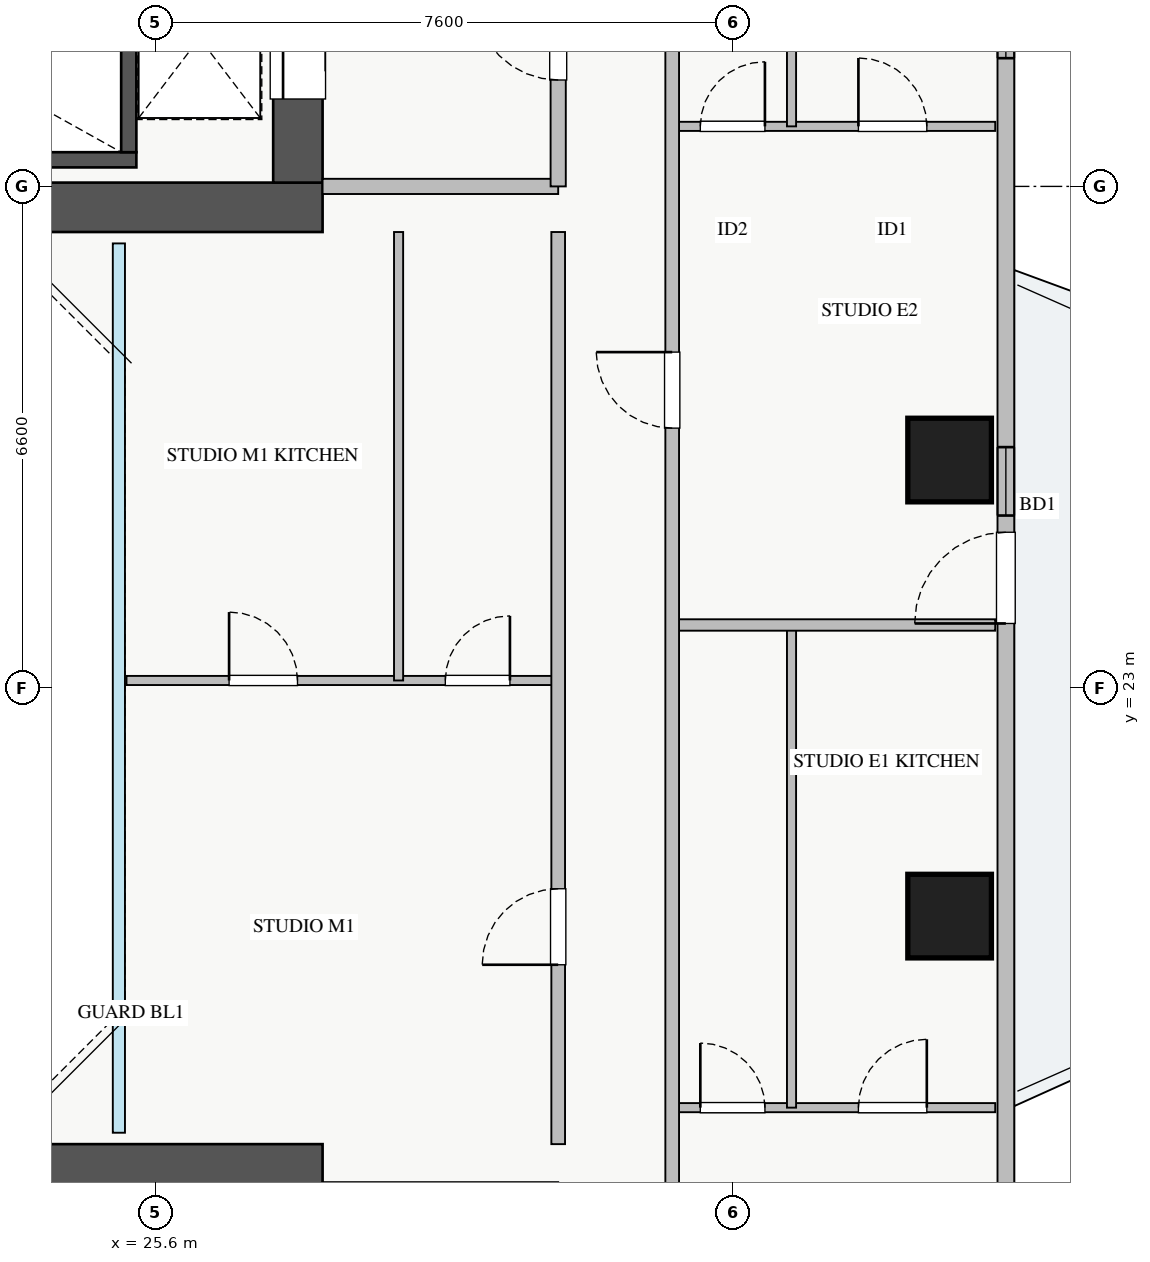
"""IFC4 building model, lengths in metres.
Left out: names, types, materials, properties, quantities, classifications, styles, units other than length and angle.
Written with IfcOpenShell. Run it as: python <this file> out.ifc"""

import sys

from ifc_helpers import new_model, si_unit, direction, frame, frame_2d, origin, origin_2d, place, context, subcontext, project, spatial, rectangle, extrude, source, transform, mapped, element, fill, save


model = new_model("IFC4")
c1 = context("Model", 3, precision=1e-05, world=origin(), true_north=direction((0.0, 1.0)))
c2 = subcontext(c1, "Body", "Model", "MODEL_VIEW")
j1 = project(units=[si_unit("LENGTHUNIT", "METRE"), si_unit("PLANEANGLEUNIT", "RADIAN")], contexts=[c1])
p1 = place(None, origin())
s1 = spatial("IfcSite", under=j1, at=p1, CompositionType="ELEMENT")
p2 = place(p1, origin())
s2 = spatial("IfcBuilding", under=s1, at=p2, CompositionType="ELEMENT")
p3 = place(p2, frame((0.0, 0.0, 136.0)))
s3 = spatial("IfcBuildingStorey", under=s2, at=p3, CompositionType="ELEMENT", Elevation=136.0)
p4 = place(p3, frame((18.2, 29.95, 0.0), z_axis=(0.0, 0.0, 1.0), x_axis=(1.0, 0.0, 0.0)))
e1 = element("IfcWall", 1, at=p4, inside=s3, PredefinedType="SHEAR", context=c2, shape_type="SweptSolid", body=[
    extrude(rectangle(XDim=7.15, YDim=0.2, at=frame_2d((3.575, 0.0))), origin(), (0.0, 0.0, 1.0), 3.25),
])
p5 = place(p3, frame((25.25, 30.05, 0.0), z_axis=(0.0, 0.0, 1.0), x_axis=(0.0, 1.0, 0.0)))
e2 = element("IfcWall", 2, at=p5, inside=s3, PredefinedType="SHEAR", context=c2, shape_type="SweptSolid", body=[
    extrude(rectangle(XDim=2.94, YDim=0.2, at=frame_2d((1.47, 0.0))), origin(), (0.0, 0.0, 1.0), 3.25),
])
p6 = place(p3, frame((10.2, 29.325, 0.0), z_axis=(0.0, 0.0, 1.0), x_axis=(1.0, 0.0, 0.0)))
e3 = element("IfcWall", 3, at=p6, inside=s3, PredefinedType="SHEAR", context=c2, shape_type="SweptSolid", body=[
    extrude(rectangle(XDim=17.6, YDim=0.65, at=frame_2d((8.8, 0.0))), origin(), (0.0, 0.0, 1.0), 3.25),
])
p7 = place(p3, frame((27.475, 29.65, 0.0), z_axis=(0.0, 0.0, 1.0), x_axis=(0.0, 1.0, 0.0)))
e4 = element("IfcWall", 4, at=p7, inside=s3, PredefinedType="SHEAR", context=c2, shape_type="SweptSolid", body=[
    extrude(rectangle(XDim=5.9, YDim=0.65, at=frame_2d((2.95, 0.0))), origin(), (0.0, 0.0, 1.0), 3.25),
])
p8 = place(p7, frame((1.1, 0.0, 0.0)))
e5 = element("IfcOpeningElement", 5, at=p8, cuts=e4, PredefinedType="OPENING", context=c2, shape_type="SweptSolid", body=[
    extrude(rectangle(XDim=1.3, YDim=2.05, at=frame_2d((0.65, 1.025))), frame((0.0, 0.335, 0.0), z_axis=(0.0, -1.0, 0.0), x_axis=(1.0, 0.0, 0.0)), (0.0, 0.0, 1.0), 0.67),
])
p9 = place(p3, frame((10.2, 16.675, 0.0), z_axis=(0.0, 0.0, 1.0), x_axis=(1.0, 0.0, 0.0)))
e6 = element("IfcWall", 6, at=p9, inside=s3, PredefinedType="SHEAR", context=c2, shape_type="SweptSolid", body=[
    extrude(rectangle(XDim=17.6, YDim=0.65, at=frame_2d((8.8, 0.0))), origin(), (0.0, 0.0, 1.0), 3.25),
])
m1 = source(origin(), c2, "Body", "SweptSolid", [
    extrude(rectangle(XDim=1.1, YDim=1.1, at=origin_2d()), origin(), (0.0, 0.0, 1.0), 3.25),
])
for number, where, z_axis, x_axis in (
    (7, (36.05, 20.0, 0.0), (0.0, 0.0, 1.0), (1.0, 0.0, 0.0)),
    (8, (36.05, 26.0, 0.0), (0.0, 0.0, 1.0), (1.0, 0.0, 0.0)),
):
    element("IfcColumn", number, at=place(p3, frame(where, z_axis=z_axis, x_axis=x_axis)), inside=s3, PredefinedType="COLUMN", context=c2, shape_type="MappedRepresentation", body=[
        mapped(m1, transform((0.0, 0.0, 0.0), x_axis=(1.0, 0.0, 0.0), y_axis=(0.0, 1.0, 0.0), z_axis=(0.0, 0.0, 1.0), scale=1.0)),
    ])
p10 = place(p3, frame((36.79, 10.55, 0.0), z_axis=(0.0, 0.0, 1.0), x_axis=(0.0, 1.0, 0.0)))
e9 = element("IfcWall", 9, at=p10, inside=s3, PredefinedType="STANDARD", context=c2, shape_type="SweptSolid", body=[
    extrude(rectangle(XDim=24.9, YDim=0.22, at=frame_2d((12.45, 0.0))), origin(), (0.0, 0.0, 1.0), 2.57),
])
p11 = place(p10, frame((13.3, 0.0, 0.0)))
e10 = element("IfcOpeningElement", 10, at=p11, cuts=e9, PredefinedType="OPENING", context=c2, shape_type="SweptSolid", body=[
    extrude(rectangle(XDim=1.2, YDim=2.1, at=frame_2d((0.6, 1.05))), frame((0.0, 0.12, 0.0), z_axis=(0.0, -1.0, 0.0), x_axis=(1.0, 0.0, 0.0)), (0.0, 0.0, 1.0), 0.24),
])
p12 = place(p10, frame((1.912, 0.0, 0.9)))
e11 = element("IfcOpeningElement", 11, at=p12, cuts=e9, PredefinedType="OPENING", context=c2, shape_type="SweptSolid", body=[
    extrude(rectangle(XDim=2.4, YDim=1.48, at=frame_2d((1.2, 0.74))), frame((0.0, 0.12, 0.0), z_axis=(0.0, -1.0, 0.0), x_axis=(1.0, 0.0, 0.0)), (0.0, 0.0, 1.0), 0.24),
])
p13 = place(p10, frame((20.737, 0.0, 0.9)))
e12 = element("IfcOpeningElement", 12, at=p13, cuts=e9, PredefinedType="OPENING", context=c2, shape_type="SweptSolid", body=[
    extrude(rectangle(XDim=2.1, YDim=1.48, at=frame_2d((1.05, 0.74))), frame((0.0, 0.12, 0.0), z_axis=(0.0, -1.0, 0.0), x_axis=(1.0, 0.0, 0.0)), (0.0, 0.0, 1.0), 0.24),
])
p14 = place(p10, frame((14.72, 0.0, 0.9)))
e13 = element("IfcOpeningElement", 13, at=p14, cuts=e9, PredefinedType="OPENING", context=c2, shape_type="SweptSolid", body=[
    extrude(rectangle(XDim=0.9, YDim=1.2, at=frame_2d((0.45, 0.6))), frame((0.0, 0.12, 0.0), z_axis=(0.0, -1.0, 0.0), x_axis=(1.0, 0.0, 0.0)), (0.0, 0.0, 1.0), 0.24),
])
p15 = place(p3, frame((27.8, 29.6, 0.0), z_axis=(0.0, 0.0, 1.0), x_axis=(1.0, 0.0, 0.0)))
e14 = element("IfcWall", 14, at=p15, inside=s3, PredefinedType="PARTITIONING", context=c2, shape_type="SweptSolid", body=[
    extrude(rectangle(XDim=3.1, YDim=0.2, at=frame_2d((1.55, 0.0))), origin(), (0.0, 0.0, 1.0), 3.03),
])
p16 = place(p3, frame((30.9, 29.6, 0.0), z_axis=(0.0, 0.0, 1.0), x_axis=(0.0, 1.0, 0.0)))
e15 = element("IfcWall", 15, at=p16, inside=s3, PredefinedType="PARTITIONING", context=c2, shape_type="SweptSolid", body=[
    extrude(rectangle(XDim=3.9, YDim=0.2, at=frame_2d((1.95, 0.0))), origin(), (0.0, 0.0, 1.0), 3.03),
])
p17 = place(p16, frame((1.4, 0.0, 0.0)))
e16 = element("IfcOpeningElement", 16, at=p17, cuts=e15, PredefinedType="OPENING", context=c2, shape_type="SweptSolid", body=[
    extrude(rectangle(XDim=1.1, YDim=2.05, at=frame_2d((0.55, 1.025))), frame((0.0, 0.11, 0.0), z_axis=(0.0, -1.0, 0.0), x_axis=(1.0, 0.0, 0.0)), (0.0, 0.0, 1.0), 0.22),
])
p18 = place(p3, frame((32.4, 17.48, 0.0), z_axis=(0.0, 0.0, 1.0), x_axis=(1.0, 0.0, 0.0)))
e17 = element("IfcWall", 17, at=p18, inside=s3, PredefinedType="PLUMBINGWALL", context=c2, shape_type="SweptSolid", body=[
    extrude(rectangle(XDim=4.25, YDim=0.12, at=frame_2d((2.125, 0.0))), origin(), (0.0, 0.0, 1.0), 3.03),
])
p19 = place(p18, frame((0.37, 0.0, 0.0)))
e18 = element("IfcOpeningElement", 18, at=p19, cuts=e17, PredefinedType="OPENING", context=c2, shape_type="SweptSolid", body=[
    extrude(rectangle(XDim=0.85, YDim=2.05, at=frame_2d((0.425, 1.025))), frame((0.0, 0.07, 0.0), z_axis=(0.0, -1.0, 0.0), x_axis=(1.0, 0.0, 0.0)), (0.0, 0.0, 1.0), 0.14),
])
p20 = place(p18, frame((2.45, 0.0, 0.0)))
e19 = element("IfcOpeningElement", 19, at=p20, cuts=e17, PredefinedType="OPENING", context=c2, shape_type="SweptSolid", body=[
    extrude(rectangle(XDim=0.9, YDim=2.05, at=frame_2d((0.45, 1.025))), frame((0.0, 0.07, 0.0), z_axis=(0.0, -1.0, 0.0), x_axis=(1.0, 0.0, 0.0)), (0.0, 0.0, 1.0), 0.14),
])
p21 = place(p3, frame((33.97, 17.48, 0.0), z_axis=(0.0, 0.0, 1.0), x_axis=(0.0, 1.0, 0.0)))
e20 = element("IfcWall", 20, at=p21, inside=s3, PredefinedType="PLUMBINGWALL", context=c2, shape_type="SweptSolid", body=[
    extrude(rectangle(XDim=6.35, YDim=0.12, at=frame_2d((3.175, 0.0))), origin(), (0.0, 0.0, 1.0), 3.03),
])
p22 = place(p3, frame((32.4, 30.39, 0.0), z_axis=(0.0, 0.0, 1.0), x_axis=(1.0, 0.0, 0.0)))
e21 = element("IfcWall", 21, at=p22, inside=s3, PredefinedType="PLUMBINGWALL", context=c2, shape_type="SweptSolid", body=[
    extrude(rectangle(XDim=4.25, YDim=0.12, at=frame_2d((2.125, 0.0))), origin(), (0.0, 0.0, 1.0), 3.03),
])
p23 = place(p22, frame((0.37, 0.0, 0.0)))
e22 = element("IfcOpeningElement", 22, at=p23, cuts=e21, PredefinedType="OPENING", context=c2, shape_type="SweptSolid", body=[
    extrude(rectangle(XDim=0.85, YDim=2.05, at=frame_2d((0.425, 1.025))), frame((0.0, 0.07, 0.0), z_axis=(0.0, -1.0, 0.0), x_axis=(1.0, 0.0, 0.0)), (0.0, 0.0, 1.0), 0.14),
])
p24 = place(p22, frame((2.45, 0.0, 0.0)))
e23 = element("IfcOpeningElement", 23, at=p24, cuts=e21, PredefinedType="OPENING", context=c2, shape_type="SweptSolid", body=[
    extrude(rectangle(XDim=0.9, YDim=2.05, at=frame_2d((0.45, 1.025))), frame((0.0, 0.07, 0.0), z_axis=(0.0, -1.0, 0.0), x_axis=(1.0, 0.0, 0.0)), (0.0, 0.0, 1.0), 0.14),
])
p25 = place(p3, frame((33.97, 30.39, 0.0), z_axis=(0.0, 0.0, 1.0), x_axis=(0.0, 1.0, 0.0)))
e24 = element("IfcWall", 24, at=p25, inside=s3, PredefinedType="PLUMBINGWALL", context=c2, shape_type="SweptSolid", body=[
    extrude(rectangle(XDim=5.59, YDim=0.12, at=frame_2d((2.795, 0.0))), origin(), (0.0, 0.0, 1.0), 3.03),
])
p26 = place(p3, frame((32.4, 23.83, 0.0), z_axis=(0.0, 0.0, 1.0), x_axis=(1.0, 0.0, 0.0)))
e25 = element("IfcWall", 25, at=p26, inside=s3, PredefinedType="PARTITIONING", context=c2, shape_type="SweptSolid", body=[
    extrude(rectangle(XDim=4.25, YDim=0.15, at=frame_2d((2.125, 0.0))), origin(), (0.0, 0.0, 1.0), 3.03),
])
p27 = place(p3, frame((32.4, 8.31, 0.0), z_axis=(0.0, 0.0, 1.0), x_axis=(0.0, 1.0, 0.0)))
e26 = element("IfcWall", 26, at=p27, inside=s3, PredefinedType="PARTITIONING", context=c2, shape_type="SweptSolid", body=[
    extrude(rectangle(XDim=29.13, YDim=0.18, at=frame_2d((14.565, 0.0))), origin(), (0.0, 0.0, 1.0), 3.03),
])
p28 = place(p27, frame((27.94, 0.0, 0.0)))
e27 = element("IfcOpeningElement", 27, at=p28, cuts=e26, PredefinedType="OPENING", context=c2, shape_type="SweptSolid", body=[
    extrude(rectangle(XDim=0.9, YDim=2.05, at=frame_2d((0.45, 1.025))), frame((0.0, 0.1, 0.0), z_axis=(0.0, -1.0, 0.0), x_axis=(1.0, 0.0, 0.0)), (0.0, 0.0, 1.0), 0.2),
])
p29 = place(p27, frame((0.415, 0.0, 0.0)))
e28 = element("IfcOpeningElement", 28, at=p29, cuts=e26, PredefinedType="OPENING", context=c2, shape_type="SweptSolid", body=[
    extrude(rectangle(XDim=0.9, YDim=2.05, at=frame_2d((0.45, 1.025))), frame((0.0, 0.1, 0.0), z_axis=(0.0, -1.0, 0.0), x_axis=(1.0, 0.0, 0.0)), (0.0, 0.0, 1.0), 0.2),
])
p30 = place(p27, frame((4.75, 0.0, 0.0)))
e29 = element("IfcOpeningElement", 29, at=p30, cuts=e26, PredefinedType="OPENING", context=c2, shape_type="SweptSolid", body=[
    extrude(rectangle(XDim=1.0, YDim=2.05, at=frame_2d((0.5, 1.025))), frame((0.0, 0.1, 0.0), z_axis=(0.0, -1.0, 0.0), x_axis=(1.0, 0.0, 0.0)), (0.0, 0.0, 1.0), 0.2),
])
p31 = place(p27, frame((18.11, 0.0, 0.0)))
e30 = element("IfcOpeningElement", 30, at=p31, cuts=e26, PredefinedType="OPENING", context=c2, shape_type="SweptSolid", body=[
    extrude(rectangle(XDim=1.0, YDim=2.05, at=frame_2d((0.5, 1.025))), frame((0.0, 0.1, 0.0), z_axis=(0.0, -1.0, 0.0), x_axis=(1.0, 0.0, 0.0)), (0.0, 0.0, 1.0), 0.2),
])
p32 = place(p3, frame((25.22, 23.1, 0.0), z_axis=(0.0, 0.0, 1.0), x_axis=(1.0, 0.0, 0.0)))
e31 = element("IfcWall", 31, at=p32, inside=s3, PredefinedType="PLUMBINGWALL", context=c2, shape_type="SweptSolid", body=[
    extrude(rectangle(XDim=5.68, YDim=0.12, at=frame_2d((2.84, 0.0))), origin(), (0.0, 0.0, 1.0), 3.03),
])
p33 = place(p32, frame((1.35, 0.0, 0.0)))
e32 = element("IfcOpeningElement", 32, at=p33, cuts=e31, PredefinedType="OPENING", context=c2, shape_type="SweptSolid", body=[
    extrude(rectangle(XDim=0.9, YDim=2.05, at=frame_2d((0.45, 1.025))), frame((0.0, 0.07, 0.0), z_axis=(0.0, -1.0, 0.0), x_axis=(1.0, 0.0, 0.0)), (0.0, 0.0, 1.0), 0.14),
])
p34 = place(p32, frame((4.195, 0.0, 0.0)))
e33 = element("IfcOpeningElement", 33, at=p34, cuts=e31, PredefinedType="OPENING", context=c2, shape_type="SweptSolid", body=[
    extrude(rectangle(XDim=0.85, YDim=2.05, at=frame_2d((0.425, 1.025))), frame((0.0, 0.07, 0.0), z_axis=(0.0, -1.0, 0.0), x_axis=(1.0, 0.0, 0.0)), (0.0, 0.0, 1.0), 0.14),
])
p35 = place(p3, frame((28.8, 23.1, 0.0), z_axis=(0.0, 0.0, 1.0), x_axis=(0.0, 1.0, 0.0)))
e34 = element("IfcWall", 34, at=p35, inside=s3, PredefinedType="PLUMBINGWALL", context=c2, shape_type="SweptSolid", body=[
    extrude(rectangle(XDim=5.9, YDim=0.12, at=frame_2d((2.95, 0.0))), origin(), (0.0, 0.0, 1.0), 3.03),
])
p36 = place(p3, frame((30.9, 17.0, 0.0), z_axis=(0.0, 0.0, 1.0), x_axis=(0.0, 1.0, 0.0)))
e35 = element("IfcWall", 35, at=p36, inside=s3, PredefinedType="PARTITIONING", context=c2, shape_type="SweptSolid", body=[
    extrude(rectangle(XDim=12.0, YDim=0.18, at=frame_2d((6.0, 0.0))), origin(), (0.0, 0.0, 1.0), 3.03),
])
p37 = place(p36, frame((2.36, 0.0, 0.0)))
e36 = element("IfcOpeningElement", 36, at=p37, cuts=e35, PredefinedType="OPENING", context=c2, shape_type="SweptSolid", body=[
    extrude(rectangle(XDim=1.0, YDim=2.05, at=frame_2d((0.5, 1.025))), frame((0.0, 0.1, 0.0), z_axis=(0.0, -1.0, 0.0), x_axis=(1.0, 0.0, 0.0)), (0.0, 0.0, 1.0), 0.2),
])
m2 = source(origin(), c2, "Body", "SweptSolid", [
    extrude(rectangle(XDim=1.2, YDim=2.1, at=frame_2d((0.6, 1.05))), frame((0.0, 0.025, 0.0), z_axis=(0.0, -1.0, 0.0), x_axis=(1.0, 0.0, 0.0)), (0.0, 0.0, 1.0), 0.05),
])
p38 = place(p11, origin())
e37 = element("IfcDoor", 37, at=p38, inside=s3, OperationType="SINGLE_SWING_LEFT", PredefinedType="DOOR", context=c2, shape_type="MappedRepresentation", body=[
    mapped(m2, transform((0.0, 0.0, 0.0), x_axis=(1.0, 0.0, 0.0), y_axis=(0.0, 1.0, 0.0), z_axis=(0.0, 0.0, 1.0), scale=1.0)),
])
fill(e10, e37)
m3 = source(origin(), c2, "Body", "SweptSolid", [
    extrude(rectangle(XDim=2.1, YDim=1.48, at=frame_2d((1.05, 0.74))), frame((0.0, 0.03, 0.0), z_axis=(0.0, -1.0, 0.0), x_axis=(1.0, 0.0, 0.0)), (0.0, 0.0, 1.0), 0.06),
])
p39 = place(p13, origin())
e38 = element("IfcWindow", 38, at=p39, inside=s3, PartitioningType="TRIPLE_PANEL_VERTICAL", PredefinedType="WINDOW", context=c2, shape_type="MappedRepresentation", body=[
    mapped(m3, transform((0.0, 0.0, 0.0), x_axis=(1.0, 0.0, 0.0), y_axis=(0.0, 1.0, 0.0), z_axis=(0.0, 0.0, 1.0), scale=1.0)),
])
fill(e12, e38)
m4 = source(origin(), c2, "Body", "SweptSolid", [
    extrude(rectangle(XDim=1.3, YDim=2.05, at=frame_2d((0.65, 1.025))), frame((0.0, 0.025, 0.0), z_axis=(0.0, -1.0, 0.0), x_axis=(1.0, 0.0, 0.0)), (0.0, 0.0, 1.0), 0.05),
])
p40 = place(p8, origin())
e39 = element("IfcDoor", 39, at=p40, inside=s3, OperationType="SLIDING_TO_LEFT", PredefinedType="DOOR", context=c2, shape_type="MappedRepresentation", body=[
    mapped(m4, transform((0.0, 0.0, 0.0), x_axis=(1.0, 0.0, 0.0), y_axis=(0.0, 1.0, 0.0), z_axis=(0.0, 0.0, 1.0), scale=1.0)),
])
fill(e5, e39)
m5 = source(origin(), c2, "Body", "SweptSolid", [
    extrude(rectangle(XDim=1.1, YDim=2.05, at=frame_2d((0.55, 1.025))), frame((0.0, 0.025, 0.0), z_axis=(0.0, -1.0, 0.0), x_axis=(1.0, 0.0, 0.0)), (0.0, 0.0, 1.0), 0.05),
])
p41 = place(p17, origin())
e40 = element("IfcDoor", 40, at=p41, inside=s3, OperationType="SINGLE_SWING_RIGHT", PredefinedType="DOOR", context=c2, shape_type="MappedRepresentation", body=[
    mapped(m5, transform((0.0, 0.0, 0.0), x_axis=(1.0, 0.0, 0.0), y_axis=(0.0, 1.0, 0.0), z_axis=(0.0, 0.0, 1.0), scale=1.0)),
])
fill(e16, e40)
m6 = source(origin(), c2, "Body", "SweptSolid", [
    extrude(rectangle(XDim=0.85, YDim=2.05, at=frame_2d((0.425, 1.025))), frame((0.0, 0.025, 0.0), z_axis=(0.0, -1.0, 0.0), x_axis=(1.0, 0.0, 0.0)), (0.0, 0.0, 1.0), 0.05),
])
p42 = place(p19, origin())
e41 = element("IfcDoor", 41, at=p42, inside=s3, OperationType="SINGLE_SWING_LEFT", PredefinedType="DOOR", context=c2, shape_type="MappedRepresentation", body=[
    mapped(m6, transform((0.0, 0.0, 0.0), x_axis=(1.0, 0.0, 0.0), y_axis=(0.0, 1.0, 0.0), z_axis=(0.0, 0.0, 1.0), scale=1.0)),
])
fill(e18, e41)
m7 = source(origin(), c2, "Body", "SweptSolid", [
    extrude(rectangle(XDim=0.9, YDim=2.05, at=frame_2d((0.45, 1.025))), frame((0.0, 0.025, 0.0), z_axis=(0.0, -1.0, 0.0), x_axis=(1.0, 0.0, 0.0)), (0.0, 0.0, 1.0), 0.05),
])
p43 = place(p20, origin())
e42 = element("IfcDoor", 42, at=p43, inside=s3, OperationType="SINGLE_SWING_RIGHT", PredefinedType="DOOR", context=c2, shape_type="MappedRepresentation", body=[
    mapped(m7, transform((0.0, 0.0, 0.0), x_axis=(1.0, 0.0, 0.0), y_axis=(0.0, 1.0, 0.0), z_axis=(0.0, 0.0, 1.0), scale=1.0)),
])
fill(e19, e42)
p44 = place(p23, origin())
e43 = element("IfcDoor", 43, at=p44, inside=s3, OperationType="SINGLE_SWING_RIGHT", PredefinedType="DOOR", context=c2, shape_type="MappedRepresentation", body=[
    mapped(m6, transform((0.0, 0.0, 0.0), x_axis=(1.0, 0.0, 0.0), y_axis=(0.0, 1.0, 0.0), z_axis=(0.0, 0.0, 1.0), scale=1.0)),
])
fill(e22, e43)
p45 = place(p24, origin())
e44 = element("IfcDoor", 44, at=p45, inside=s3, OperationType="SINGLE_SWING_LEFT", PredefinedType="DOOR", context=c2, shape_type="MappedRepresentation", body=[
    mapped(m7, transform((0.0, 0.0, 0.0), x_axis=(1.0, 0.0, 0.0), y_axis=(0.0, 1.0, 0.0), z_axis=(0.0, 0.0, 1.0), scale=1.0)),
])
fill(e23, e44)
m8 = source(origin(), c2, "Body", "SweptSolid", [
    extrude(rectangle(XDim=1.0, YDim=2.05, at=frame_2d((0.5, 1.025))), frame((0.0, 0.025, 0.0), z_axis=(0.0, -1.0, 0.0), x_axis=(1.0, 0.0, 0.0)), (0.0, 0.0, 1.0), 0.05),
])
p46 = place(p31, origin())
e45 = element("IfcDoor", 45, at=p46, inside=s3, OperationType="SINGLE_SWING_RIGHT", PredefinedType="DOOR", context=c2, shape_type="MappedRepresentation", body=[
    mapped(m8, transform((0.0, 0.0, 0.0), x_axis=(1.0, 0.0, 0.0), y_axis=(0.0, 1.0, 0.0), z_axis=(0.0, 0.0, 1.0), scale=1.0)),
])
fill(e30, e45)
p47 = place(p33, origin())
e46 = element("IfcDoor", 46, at=p47, inside=s3, OperationType="SINGLE_SWING_LEFT", PredefinedType="DOOR", context=c2, shape_type="MappedRepresentation", body=[
    mapped(m7, transform((0.0, 0.0, 0.0), x_axis=(1.0, 0.0, 0.0), y_axis=(0.0, 1.0, 0.0), z_axis=(0.0, 0.0, 1.0), scale=1.0)),
])
fill(e32, e46)
p48 = place(p34, origin())
e47 = element("IfcDoor", 47, at=p48, inside=s3, OperationType="SINGLE_SWING_RIGHT", PredefinedType="DOOR", context=c2, shape_type="MappedRepresentation", body=[
    mapped(m6, transform((0.0, 0.0, 0.0), x_axis=(1.0, 0.0, 0.0), y_axis=(0.0, 1.0, 0.0), z_axis=(0.0, 0.0, 1.0), scale=1.0)),
])
fill(e33, e47)
p49 = place(p37, origin())
e48 = element("IfcDoor", 48, at=p49, inside=s3, OperationType="SINGLE_SWING_LEFT", PredefinedType="DOOR", context=c2, shape_type="MappedRepresentation", body=[
    mapped(m8, transform((0.0, 0.0, 0.0), x_axis=(1.0, 0.0, 0.0), y_axis=(0.0, 1.0, 0.0), z_axis=(0.0, 0.0, 1.0), scale=1.0)),
])
fill(e36, e48)
m9 = source(origin(), c2, "Body", "SweptSolid", [
    extrude(rectangle(XDim=0.9, YDim=1.2, at=frame_2d((0.45, 0.6))), frame((0.0, 0.03, 0.0), z_axis=(0.0, -1.0, 0.0), x_axis=(1.0, 0.0, 0.0)), (0.0, 0.0, 1.0), 0.06),
])
p50 = place(p14, origin())
e49 = element("IfcWindow", 49, at=p50, inside=s3, PartitioningType="SINGLE_PANEL", PredefinedType="WINDOW", context=c2, shape_type="MappedRepresentation", body=[
    mapped(m9, transform((0.0, 0.0, 0.0), x_axis=(1.0, 0.0, 0.0), y_axis=(0.0, 1.0, 0.0), z_axis=(0.0, 0.0, 1.0), scale=1.0)),
])
fill(e13, e49)
save(model, sys.argv[1])
